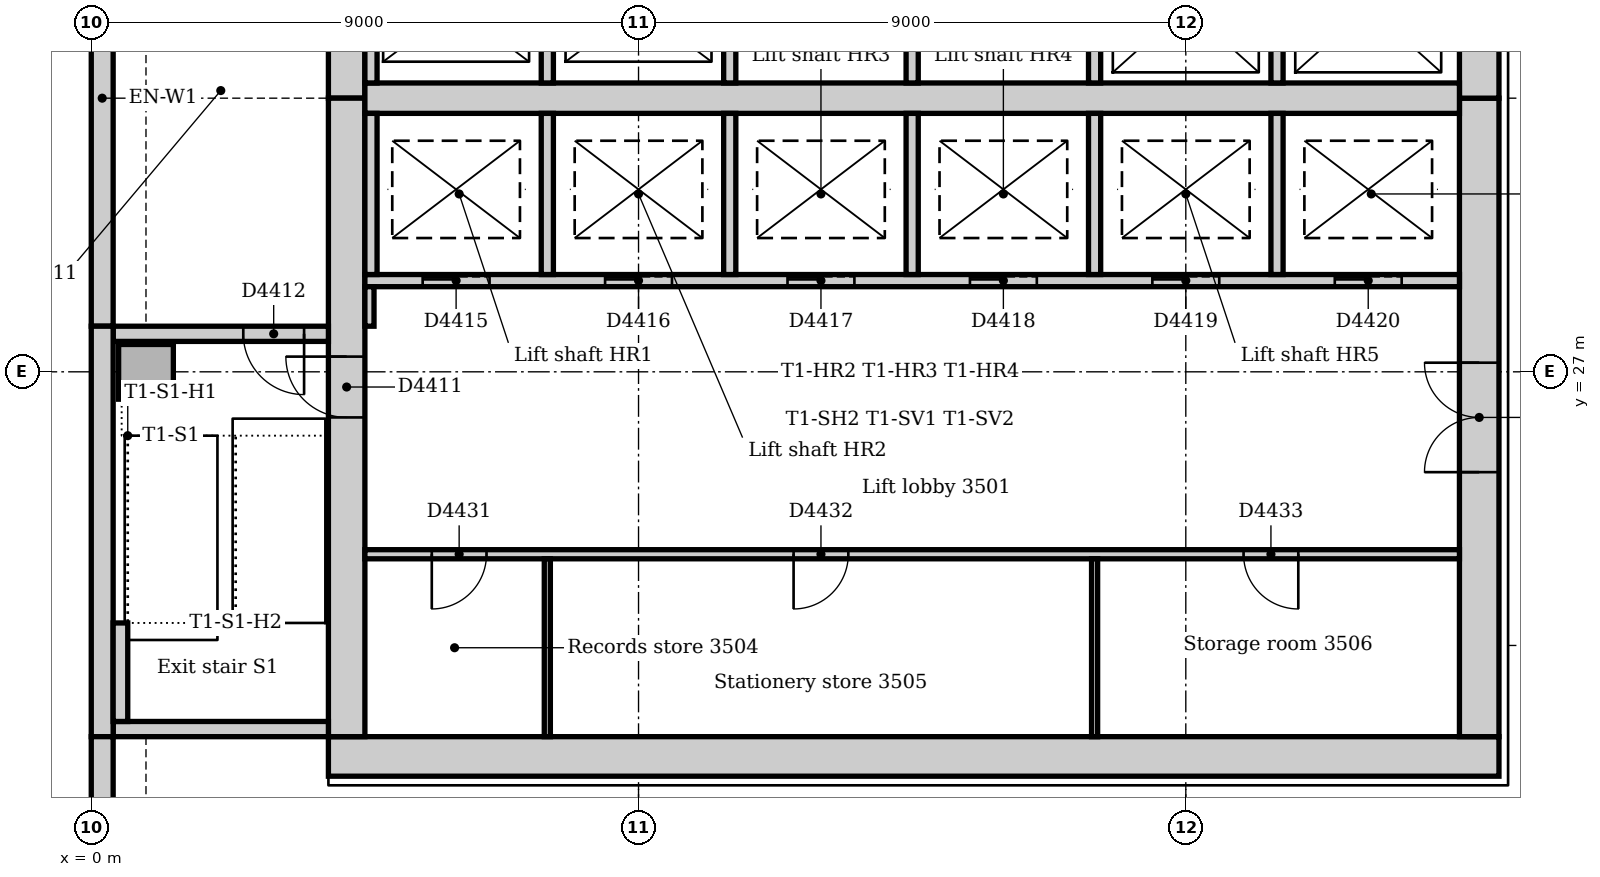
"""IFC4 building model, lengths in metres.
Left out: names, types, materials, properties, quantities, classifications, styles, units other than length and angle.
Written with IfcOpenShell. Run it as: python <this file> out.ifc"""

import sys

from ifc_helpers import new_model, si_unit, direction, frame, frame_2d, origin, origin_2d, place, context, subcontext, project, spatial, rectangle, extrude, element, fill, save


model = new_model("IFC4")
c1 = context("Model", 3, precision=1e-05, world=origin(), true_north=direction((0.0, 1.0)))
c2 = subcontext(c1, "Body", "Model", "MODEL_VIEW")
j1 = project(units=[si_unit("LENGTHUNIT", "METRE"), si_unit("PLANEANGLEUNIT", "RADIAN")], contexts=[c1])
p1 = place(None, origin())
s1 = spatial("IfcSite", under=j1, at=p1, CompositionType="ELEMENT")
p2 = place(p1, origin())
s2 = spatial("IfcBuilding", under=s1, at=p2, CompositionType="ELEMENT")
p3 = place(p2, frame((0.0, 0.0, 149.0)))
s3 = spatial("IfcBuildingStorey", under=s2, at=p3, CompositionType="ELEMENT", Elevation=149.0)
p4 = place(p3, frame((3.9, 20.675, 0.0), z_axis=(0.0, 0.0, 1.0), x_axis=(1.0, 0.0, 0.0)))
e1 = element("IfcWall", 1, at=p4, inside=s3, PredefinedType="SOLIDWALL", context=c2, shape_type="SweptSolid", body=[
    extrude(rectangle(XDim=19.25, YDim=0.65, at=frame_2d((9.625, 0.0))), origin(), (0.0, 0.0, 1.0), 4.0),
])
p5 = place(p3, frame((22.825, 21.0, 0.0), z_axis=(0.0, 0.0, 1.0), x_axis=(0.0, 1.0, 0.0)))
e2 = element("IfcWall", 2, at=p5, inside=s3, PredefinedType="SOLIDWALL", context=c2, shape_type="SweptSolid", body=[
    extrude(rectangle(XDim=10.5, YDim=0.65, at=frame_2d((5.25, 0.0))), origin(), (0.0, 0.0, 1.0), 4.0),
])
p6 = place(p5, frame((4.35, 0.0, 0.0)))
e3 = element("IfcOpeningElement", 3, at=p6, cuts=e2, PredefinedType="OPENING", context=c2, shape_type="SweptSolid", body=[
    extrude(rectangle(XDim=1.8, YDim=2.1, at=frame_2d((0.9, 1.05))), frame((0.0, 0.335, 0.0), z_axis=(0.0, -1.0, 0.0), x_axis=(1.0, 0.0, 0.0)), (0.0, 0.0, 1.0), 0.67),
])
p7 = place(p3, frame((22.825, 31.5, 0.0), z_axis=(0.0, 0.0, 1.0), x_axis=(0.0, 1.0, 0.0)))
e4 = element("IfcWall", 4, at=p7, inside=s3, PredefinedType="SOLIDWALL", context=c2, shape_type="SweptSolid", body=[
    extrude(rectangle(XDim=10.5, YDim=0.65, at=frame_2d((5.25, 0.0))), origin(), (0.0, 0.0, 1.0), 4.0),
])
p8 = place(p7, frame((3.15, 0.0, 0.0)))
e5 = element("IfcOpeningElement", 5, at=p8, cuts=e4, PredefinedType="OPENING", context=c2, shape_type="SweptSolid", body=[
    extrude(rectangle(XDim=1.0, YDim=2.1, at=frame_2d((0.5, 1.05))), frame((0.0, 0.335, 0.0), z_axis=(0.0, -1.0, 0.0), x_axis=(1.0, 0.0, 0.0)), (0.0, 0.0, 1.0), 0.67),
])
p9 = place(p7, frame((5.2, 0.0, 0.0)))
e6 = element("IfcOpeningElement", 6, at=p9, cuts=e4, PredefinedType="OPENING", context=c2, shape_type="SweptSolid", body=[
    extrude(rectangle(XDim=1.0, YDim=2.1, at=frame_2d((0.5, 1.05))), frame((0.0, 0.335, 0.0), z_axis=(0.0, -1.0, 0.0), x_axis=(1.0, 0.0, 0.0)), (0.0, 0.0, 1.0), 0.67),
])
p10 = place(p3, frame((4.2, 42.0, 0.0), z_axis=(0.0, 0.0, 1.0), x_axis=(0.0, -1.0, 0.0)))
e7 = element("IfcWall", 7, at=p10, inside=s3, PredefinedType="SOLIDWALL", context=c2, shape_type="SweptSolid", body=[
    extrude(rectangle(XDim=10.5, YDim=0.6, at=frame_2d((5.25, 0.0))), origin(), (0.0, 0.0, 1.0), 4.0),
])
p11 = place(p10, frame((5.3, 0.0, 0.0)))
e8 = element("IfcOpeningElement", 8, at=p11, cuts=e7, PredefinedType="OPENING", context=c2, shape_type="SweptSolid", body=[
    extrude(rectangle(XDim=1.0, YDim=2.1, at=frame_2d((0.5, 1.05))), frame((0.0, 0.31, 0.0), z_axis=(0.0, -1.0, 0.0), x_axis=(1.0, 0.0, 0.0)), (0.0, 0.0, 1.0), 0.62),
])
p12 = place(p3, frame((4.2, 31.5, 0.0), z_axis=(0.0, 0.0, 1.0), x_axis=(0.0, -1.0, 0.0)))
e9 = element("IfcWall", 9, at=p12, inside=s3, PredefinedType="SOLIDWALL", context=c2, shape_type="SweptSolid", body=[
    extrude(rectangle(XDim=10.5, YDim=0.6, at=frame_2d((5.25, 0.0))), origin(), (0.0, 0.0, 1.0), 4.0),
])
p13 = place(p12, frame((4.25, 0.0, 0.0)))
e10 = element("IfcOpeningElement", 10, at=p13, cuts=e9, PredefinedType="OPENING", context=c2, shape_type="SweptSolid", body=[
    extrude(rectangle(XDim=1.0, YDim=2.1, at=frame_2d((0.5, 1.05))), frame((0.0, 0.31, 0.0), z_axis=(0.0, -1.0, 0.0), x_axis=(1.0, 0.0, 0.0)), (0.0, 0.0, 1.0), 0.62),
])
p14 = place(p3, frame((4.5, 31.5, 0.0), z_axis=(0.0, 0.0, 1.0), x_axis=(1.0, 0.0, 0.0)))
e11 = element("IfcWall", 11, at=p14, inside=s3, PredefinedType="SOLIDWALL", context=c2, shape_type="SweptSolid", body=[
    extrude(rectangle(XDim=18.0, YDim=0.5, at=frame_2d((9.0, 0.0))), origin(), (0.0, 0.0, 1.0), 4.0),
])
p15 = place(p3, frame((0.36, 21.125, 0.0), z_axis=(0.0, 0.0, 1.0), x_axis=(1.0, 0.0, 0.0)))
e12 = element("IfcWall", 12, at=p15, inside=s3, PredefinedType="SOLIDWALL", context=c2, shape_type="SweptSolid", body=[
    extrude(rectangle(XDim=3.54, YDim=0.25, at=frame_2d((1.77, 0.0))), origin(), (0.0, 0.0, 1.0), 4.0),
])
p16 = place(p3, frame((3.9, 27.625, 0.0), z_axis=(0.0, 0.0, 1.0), x_axis=(-1.0, 0.0, 0.0)))
e13 = element("IfcWall", 13, at=p16, inside=s3, PredefinedType="SOLIDWALL", context=c2, shape_type="SweptSolid", body=[
    extrude(rectangle(XDim=3.54, YDim=0.25, at=frame_2d((1.77, 0.0))), origin(), (0.0, 0.0, 1.0), 4.0),
])
p17 = place(p16, frame((0.4, 0.0, 0.0)))
e14 = element("IfcOpeningElement", 14, at=p17, cuts=e13, PredefinedType="OPENING", context=c2, shape_type="SweptSolid", body=[
    extrude(rectangle(XDim=1.0, YDim=2.1, at=frame_2d((0.5, 1.05))), frame((0.0, 0.135, 0.0), z_axis=(0.0, -1.0, 0.0), x_axis=(1.0, 0.0, 0.0)), (0.0, 0.0, 1.0), 0.27),
])
p18 = place(p3, frame((0.9, 27.0, 0.0), z_axis=(0.0, 0.0, 1.0), x_axis=(1.0, 0.0, 0.0)))
e15 = element("IfcColumn", 15, at=p18, inside=s3, PredefinedType="COLUMN", context=c2, shape_type="SweptSolid", body=[
    extrude(rectangle(XDim=0.9, YDim=0.9, at=origin_2d()), origin(), (0.0, 0.0, 1.0), 4.0),
])
p19 = place(p3, frame((0.18, 35.25, 0.0), z_axis=(0.0, 0.0, 1.0), x_axis=(0.0, -1.0, 0.0)))
e16 = element("IfcWall", 16, at=p19, inside=s3, PredefinedType="STANDARD", context=c2, shape_type="SweptSolid", body=[
    extrude(rectangle(XDim=7.5, YDim=0.36, at=frame_2d((3.75, 0.0))), origin(), (0.0, 0.0, 1.0), 3.85),
])
p20 = place(p3, frame((0.18, 27.75, 0.0), z_axis=(0.0, 0.0, 1.0), x_axis=(0.0, -1.0, 0.0)))
e17 = element("IfcWall", 17, at=p20, inside=s3, PredefinedType="STANDARD", context=c2, shape_type="SweptSolid", body=[
    extrude(rectangle(XDim=6.75, YDim=0.36, at=frame_2d((3.375, 0.0))), origin(), (0.0, 0.0, 1.0), 3.85),
])
p21 = place(p3, frame((0.18, 21.0, 0.0), z_axis=(0.0, 0.0, 1.0), x_axis=(0.0, -1.0, 0.0)))
e18 = element("IfcWall", 18, at=p21, inside=s3, PredefinedType="STANDARD", context=c2, shape_type="SweptSolid", body=[
    extrude(rectangle(XDim=7.757, YDim=0.36, at=frame_2d((3.879, 0.0))), origin(), (0.0, 0.0, 1.0), 3.85),
])
p22 = place(p21, frame((1.35, 0.0, 0.9)))
e19 = element("IfcOpeningElement", 19, at=p22, cuts=e18, PredefinedType="OPENING", context=c2, shape_type="SweptSolid", body=[
    extrude(rectangle(XDim=3.3, YDim=1.6, at=frame_2d((1.65, 0.8))), frame((0.0, 0.19, 0.0), z_axis=(0.0, -1.0, 0.0), x_axis=(1.0, 0.0, 0.0)), (0.0, 0.0, 1.0), 0.38),
])
p23 = place(p3, frame((0.48, 21.25, 0.0), z_axis=(0.0, 0.0, 1.0), x_axis=(0.0, 1.0, 0.0)))
e20 = element("IfcWall", 20, at=p23, inside=s3, PredefinedType="STANDARD", context=c2, shape_type="SweptSolid", body=[
    extrude(rectangle(XDim=1.62, YDim=0.24, at=frame_2d((0.81, 0.0))), origin(), (0.0, 0.0, 1.0), 4.0),
])
p24 = place(p3, frame((4.5, 28.5, 0.0), z_axis=(0.0, 0.0, 1.0), x_axis=(1.0, 0.0, 0.0)))
e21 = element("IfcWall", 21, at=p24, inside=s3, PredefinedType="PARTITIONING", context=c2, shape_type="SweptSolid", body=[
    extrude(rectangle(XDim=18.0, YDim=0.2, at=frame_2d((9.0, 0.0))), origin(), (0.0, 0.0, 1.0), 3.85),
])
p25 = place(p24, frame((0.95, 0.0, 0.0)))
e22 = element("IfcOpeningElement", 22, at=p25, cuts=e21, PredefinedType="OPENING", context=c2, shape_type="SweptSolid", body=[
    extrude(rectangle(XDim=1.1, YDim=2.1, at=frame_2d((0.55, 1.05))), frame((0.0, 0.11, 0.0), z_axis=(0.0, -1.0, 0.0), x_axis=(1.0, 0.0, 0.0)), (0.0, 0.0, 1.0), 0.22),
])
p26 = place(p24, frame((3.95, 0.0, 0.0)))
e23 = element("IfcOpeningElement", 23, at=p26, cuts=e21, PredefinedType="OPENING", context=c2, shape_type="SweptSolid", body=[
    extrude(rectangle(XDim=1.1, YDim=2.1, at=frame_2d((0.55, 1.05))), frame((0.0, 0.11, 0.0), z_axis=(0.0, -1.0, 0.0), x_axis=(1.0, 0.0, 0.0)), (0.0, 0.0, 1.0), 0.22),
])
p27 = place(p24, frame((6.95, 0.0, 0.0)))
e24 = element("IfcOpeningElement", 24, at=p27, cuts=e21, PredefinedType="OPENING", context=c2, shape_type="SweptSolid", body=[
    extrude(rectangle(XDim=1.1, YDim=2.1, at=frame_2d((0.55, 1.05))), frame((0.0, 0.11, 0.0), z_axis=(0.0, -1.0, 0.0), x_axis=(1.0, 0.0, 0.0)), (0.0, 0.0, 1.0), 0.22),
])
p28 = place(p24, frame((9.95, 0.0, 0.0)))
e25 = element("IfcOpeningElement", 25, at=p28, cuts=e21, PredefinedType="OPENING", context=c2, shape_type="SweptSolid", body=[
    extrude(rectangle(XDim=1.1, YDim=2.1, at=frame_2d((0.55, 1.05))), frame((0.0, 0.11, 0.0), z_axis=(0.0, -1.0, 0.0), x_axis=(1.0, 0.0, 0.0)), (0.0, 0.0, 1.0), 0.22),
])
p29 = place(p24, frame((12.95, 0.0, 0.0)))
e26 = element("IfcOpeningElement", 26, at=p29, cuts=e21, PredefinedType="OPENING", context=c2, shape_type="SweptSolid", body=[
    extrude(rectangle(XDim=1.1, YDim=2.1, at=frame_2d((0.55, 1.05))), frame((0.0, 0.11, 0.0), z_axis=(0.0, -1.0, 0.0), x_axis=(1.0, 0.0, 0.0)), (0.0, 0.0, 1.0), 0.22),
])
p30 = place(p24, frame((15.95, 0.0, 0.0)))
e27 = element("IfcOpeningElement", 27, at=p30, cuts=e21, PredefinedType="OPENING", context=c2, shape_type="SweptSolid", body=[
    extrude(rectangle(XDim=1.1, YDim=2.1, at=frame_2d((0.55, 1.05))), frame((0.0, 0.11, 0.0), z_axis=(0.0, -1.0, 0.0), x_axis=(1.0, 0.0, 0.0)), (0.0, 0.0, 1.0), 0.22),
])
for number, where, z_axis, x_axis in (
    (28, (4.6, 31.75, 0.0), (0.0, 0.0, 1.0), (0.0, 1.0, 0.0)),
    (29, (4.6, 28.6, 0.0), (0.0, 0.0, 1.0), (0.0, 1.0, 0.0)),
    (30, (7.5, 28.6, 0.0), (0.0, 0.0, 1.0), (0.0, 1.0, 0.0)),
    (31, (7.5, 31.75, 0.0), (0.0, 0.0, 1.0), (0.0, 1.0, 0.0)),
    (32, (10.5, 28.6, 0.0), (0.0, 0.0, 1.0), (0.0, 1.0, 0.0)),
    (33, (10.5, 31.75, 0.0), (0.0, 0.0, 1.0), (0.0, 1.0, 0.0)),
    (34, (13.5, 28.6, 0.0), (0.0, 0.0, 1.0), (0.0, 1.0, 0.0)),
    (35, (13.5, 31.75, 0.0), (0.0, 0.0, 1.0), (0.0, 1.0, 0.0)),
    (36, (16.5, 28.6, 0.0), (0.0, 0.0, 1.0), (0.0, 1.0, 0.0)),
    (37, (16.5, 31.75, 0.0), (0.0, 0.0, 1.0), (0.0, 1.0, 0.0)),
    (38, (19.5, 28.6, 0.0), (0.0, 0.0, 1.0), (0.0, 1.0, 0.0)),
    (39, (19.5, 31.75, 0.0), (0.0, 0.0, 1.0), (0.0, 1.0, 0.0)),
):
    element("IfcWall", number, at=place(p3, frame(where, z_axis=z_axis, x_axis=x_axis)), inside=s3, PredefinedType="PARTITIONING", context=c2, shape_type="SweptSolid", body=[
        extrude(rectangle(XDim=2.65, YDim=0.2, at=frame_2d((1.325, 0.0))), origin(), (0.0, 0.0, 1.0), 3.85),
    ])
p31 = place(p3, frame((4.5, 24.0, 0.0), z_axis=(0.0, 0.0, 1.0), x_axis=(1.0, 0.0, 0.0)))
e40 = element("IfcWall", 40, at=p31, inside=s3, PredefinedType="PARTITIONING", context=c2, shape_type="SweptSolid", body=[
    extrude(rectangle(XDim=18.0, YDim=0.15, at=frame_2d((9.0, 0.0))), origin(), (0.0, 0.0, 1.0), 3.85),
])
p32 = place(p31, frame((1.1, 0.0, 0.0)))
e41 = element("IfcOpeningElement", 41, at=p32, cuts=e40, PredefinedType="OPENING", context=c2, shape_type="SweptSolid", body=[
    extrude(rectangle(XDim=0.9, YDim=2.1, at=frame_2d((0.45, 1.05))), frame((0.0, 0.085, 0.0), z_axis=(0.0, -1.0, 0.0), x_axis=(1.0, 0.0, 0.0)), (0.0, 0.0, 1.0), 0.17),
])
p33 = place(p31, frame((7.05, 0.0, 0.0)))
e42 = element("IfcOpeningElement", 42, at=p33, cuts=e40, PredefinedType="OPENING", context=c2, shape_type="SweptSolid", body=[
    extrude(rectangle(XDim=0.9, YDim=2.1, at=frame_2d((0.45, 1.05))), frame((0.0, 0.085, 0.0), z_axis=(0.0, -1.0, 0.0), x_axis=(1.0, 0.0, 0.0)), (0.0, 0.0, 1.0), 0.17),
])
p34 = place(p31, frame((14.45, 0.0, 0.0)))
e43 = element("IfcOpeningElement", 43, at=p34, cuts=e40, PredefinedType="OPENING", context=c2, shape_type="SweptSolid", body=[
    extrude(rectangle(XDim=0.9, YDim=2.1, at=frame_2d((0.45, 1.05))), frame((0.0, 0.085, 0.0), z_axis=(0.0, -1.0, 0.0), x_axis=(1.0, 0.0, 0.0)), (0.0, 0.0, 1.0), 0.17),
])
p35 = place(p3, frame((4.575, 27.75, 0.0), z_axis=(0.0, 0.0, 1.0), x_axis=(0.0, 1.0, 0.0)))
e44 = element("IfcWall", 44, at=p35, inside=s3, PredefinedType="PARTITIONING", context=c2, shape_type="SweptSolid", body=[
    extrude(rectangle(XDim=0.65, YDim=0.15, at=frame_2d((0.325, 0.0))), origin(), (0.0, 0.0, 1.0), 3.85),
])
for number, where, z_axis, x_axis in (
    (45, (7.5, 21.0, 0.0), (0.0, 0.0, 1.0), (0.0, 1.0, 0.0)),
    (46, (16.5, 21.0, 0.0), (0.0, 0.0, 1.0), (0.0, 1.0, 0.0)),
):
    element("IfcWall", number, at=place(p3, frame(where, z_axis=z_axis, x_axis=x_axis)), inside=s3, PredefinedType="PARTITIONING", context=c2, shape_type="SweptSolid", body=[
        extrude(rectangle(XDim=2.925, YDim=0.1, at=frame_2d((1.462, 0.0))), origin(), (0.0, 0.0, 1.0), 3.85),
    ])
p36 = place(p13, frame((1.0, 0.0, 0.0), z_axis=(0.0, 0.0, 1.0), x_axis=(-1.0, 0.0, 0.0)))
e47 = element("IfcDoor", 47, at=p36, inside=s3, OperationType="SINGLE_SWING_RIGHT", PredefinedType="DOOR", context=c2, shape_type="SweptSolid", body=[
    extrude(rectangle(XDim=1.0, YDim=2.1, at=frame_2d((0.5, 1.05))), frame((0.0, 0.025, 0.0), z_axis=(0.0, -1.0, 0.0), x_axis=(1.0, 0.0, 0.0)), (0.0, 0.0, 1.0), 0.05),
])
fill(e10, e47)
p37 = place(p17, origin())
e48 = element("IfcDoor", 48, at=p37, inside=s3, OperationType="SINGLE_SWING_LEFT", PredefinedType="DOOR", context=c2, shape_type="SweptSolid", body=[
    extrude(rectangle(XDim=1.0, YDim=2.1, at=frame_2d((0.5, 1.05))), frame((0.0, 0.025, 0.0), z_axis=(0.0, -1.0, 0.0), x_axis=(1.0, 0.0, 0.0)), (0.0, 0.0, 1.0), 0.05),
])
fill(e14, e48)
p38 = place(p25, origin())
e49 = element("IfcDoor", 49, at=p38, inside=s3, OperationType="SLIDING_TO_LEFT", PredefinedType="DOOR", context=c2, shape_type="SweptSolid", body=[
    extrude(rectangle(XDim=1.1, YDim=2.1, at=frame_2d((0.55, 1.05))), frame((0.0, 0.025, 0.0), z_axis=(0.0, -1.0, 0.0), x_axis=(1.0, 0.0, 0.0)), (0.0, 0.0, 1.0), 0.05),
])
fill(e22, e49)
p39 = place(p26, origin())
e50 = element("IfcDoor", 50, at=p39, inside=s3, OperationType="SLIDING_TO_LEFT", PredefinedType="DOOR", context=c2, shape_type="SweptSolid", body=[
    extrude(rectangle(XDim=1.1, YDim=2.1, at=frame_2d((0.55, 1.05))), frame((0.0, 0.025, 0.0), z_axis=(0.0, -1.0, 0.0), x_axis=(1.0, 0.0, 0.0)), (0.0, 0.0, 1.0), 0.05),
])
fill(e23, e50)
p40 = place(p27, origin())
e51 = element("IfcDoor", 51, at=p40, inside=s3, OperationType="SLIDING_TO_LEFT", PredefinedType="DOOR", context=c2, shape_type="SweptSolid", body=[
    extrude(rectangle(XDim=1.1, YDim=2.1, at=frame_2d((0.55, 1.05))), frame((0.0, 0.025, 0.0), z_axis=(0.0, -1.0, 0.0), x_axis=(1.0, 0.0, 0.0)), (0.0, 0.0, 1.0), 0.05),
])
fill(e24, e51)
p41 = place(p28, origin())
e52 = element("IfcDoor", 52, at=p41, inside=s3, OperationType="SLIDING_TO_LEFT", PredefinedType="DOOR", context=c2, shape_type="SweptSolid", body=[
    extrude(rectangle(XDim=1.1, YDim=2.1, at=frame_2d((0.55, 1.05))), frame((0.0, 0.025, 0.0), z_axis=(0.0, -1.0, 0.0), x_axis=(1.0, 0.0, 0.0)), (0.0, 0.0, 1.0), 0.05),
])
fill(e25, e52)
p42 = place(p29, origin())
e53 = element("IfcDoor", 53, at=p42, inside=s3, OperationType="SLIDING_TO_LEFT", PredefinedType="DOOR", context=c2, shape_type="SweptSolid", body=[
    extrude(rectangle(XDim=1.1, YDim=2.1, at=frame_2d((0.55, 1.05))), frame((0.0, 0.025, 0.0), z_axis=(0.0, -1.0, 0.0), x_axis=(1.0, 0.0, 0.0)), (0.0, 0.0, 1.0), 0.05),
])
fill(e26, e53)
p43 = place(p30, origin())
e54 = element("IfcDoor", 54, at=p43, inside=s3, OperationType="SLIDING_TO_LEFT", PredefinedType="DOOR", context=c2, shape_type="SweptSolid", body=[
    extrude(rectangle(XDim=1.1, YDim=2.1, at=frame_2d((0.55, 1.05))), frame((0.0, 0.025, 0.0), z_axis=(0.0, -1.0, 0.0), x_axis=(1.0, 0.0, 0.0)), (0.0, 0.0, 1.0), 0.05),
])
fill(e27, e54)
p44 = place(p6, origin())
e55 = element("IfcDoor", 55, at=p44, inside=s3, OperationType="DOUBLE_DOOR_DOUBLE_SWING", PredefinedType="DOOR", context=c2, shape_type="SweptSolid", body=[
    extrude(rectangle(XDim=1.8, YDim=2.1, at=frame_2d((0.9, 1.05))), frame((0.0, 0.025, 0.0), z_axis=(0.0, -1.0, 0.0), x_axis=(1.0, 0.0, 0.0)), (0.0, 0.0, 1.0), 0.05),
])
fill(e3, e55)
p45 = place(p32, frame((0.9, 0.0, 0.0), z_axis=(0.0, 0.0, 1.0), x_axis=(-1.0, 0.0, 0.0)))
e56 = element("IfcDoor", 56, at=p45, inside=s3, OperationType="SINGLE_SWING_RIGHT", PredefinedType="DOOR", context=c2, shape_type="SweptSolid", body=[
    extrude(rectangle(XDim=0.9, YDim=2.1, at=frame_2d((0.45, 1.05))), frame((0.0, 0.025, 0.0), z_axis=(0.0, -1.0, 0.0), x_axis=(1.0, 0.0, 0.0)), (0.0, 0.0, 1.0), 0.05),
])
fill(e41, e56)
p46 = place(p33, frame((0.9, 0.0, 0.0), z_axis=(0.0, 0.0, 1.0), x_axis=(-1.0, 0.0, 0.0)))
e57 = element("IfcDoor", 57, at=p46, inside=s3, OperationType="SINGLE_SWING_RIGHT", PredefinedType="DOOR", context=c2, shape_type="SweptSolid", body=[
    extrude(rectangle(XDim=0.9, YDim=2.1, at=frame_2d((0.45, 1.05))), frame((0.0, 0.025, 0.0), z_axis=(0.0, -1.0, 0.0), x_axis=(1.0, 0.0, 0.0)), (0.0, 0.0, 1.0), 0.05),
])
fill(e42, e57)
p47 = place(p34, frame((0.9, 0.0, 0.0), z_axis=(0.0, 0.0, 1.0), x_axis=(-1.0, 0.0, 0.0)))
e58 = element("IfcDoor", 58, at=p47, inside=s3, OperationType="SINGLE_SWING_LEFT", PredefinedType="DOOR", context=c2, shape_type="SweptSolid", body=[
    extrude(rectangle(XDim=0.9, YDim=2.1, at=frame_2d((0.45, 1.05))), frame((0.0, 0.025, 0.0), z_axis=(0.0, -1.0, 0.0), x_axis=(1.0, 0.0, 0.0)), (0.0, 0.0, 1.0), 0.05),
])
fill(e43, e58)
save(model, sys.argv[1])
